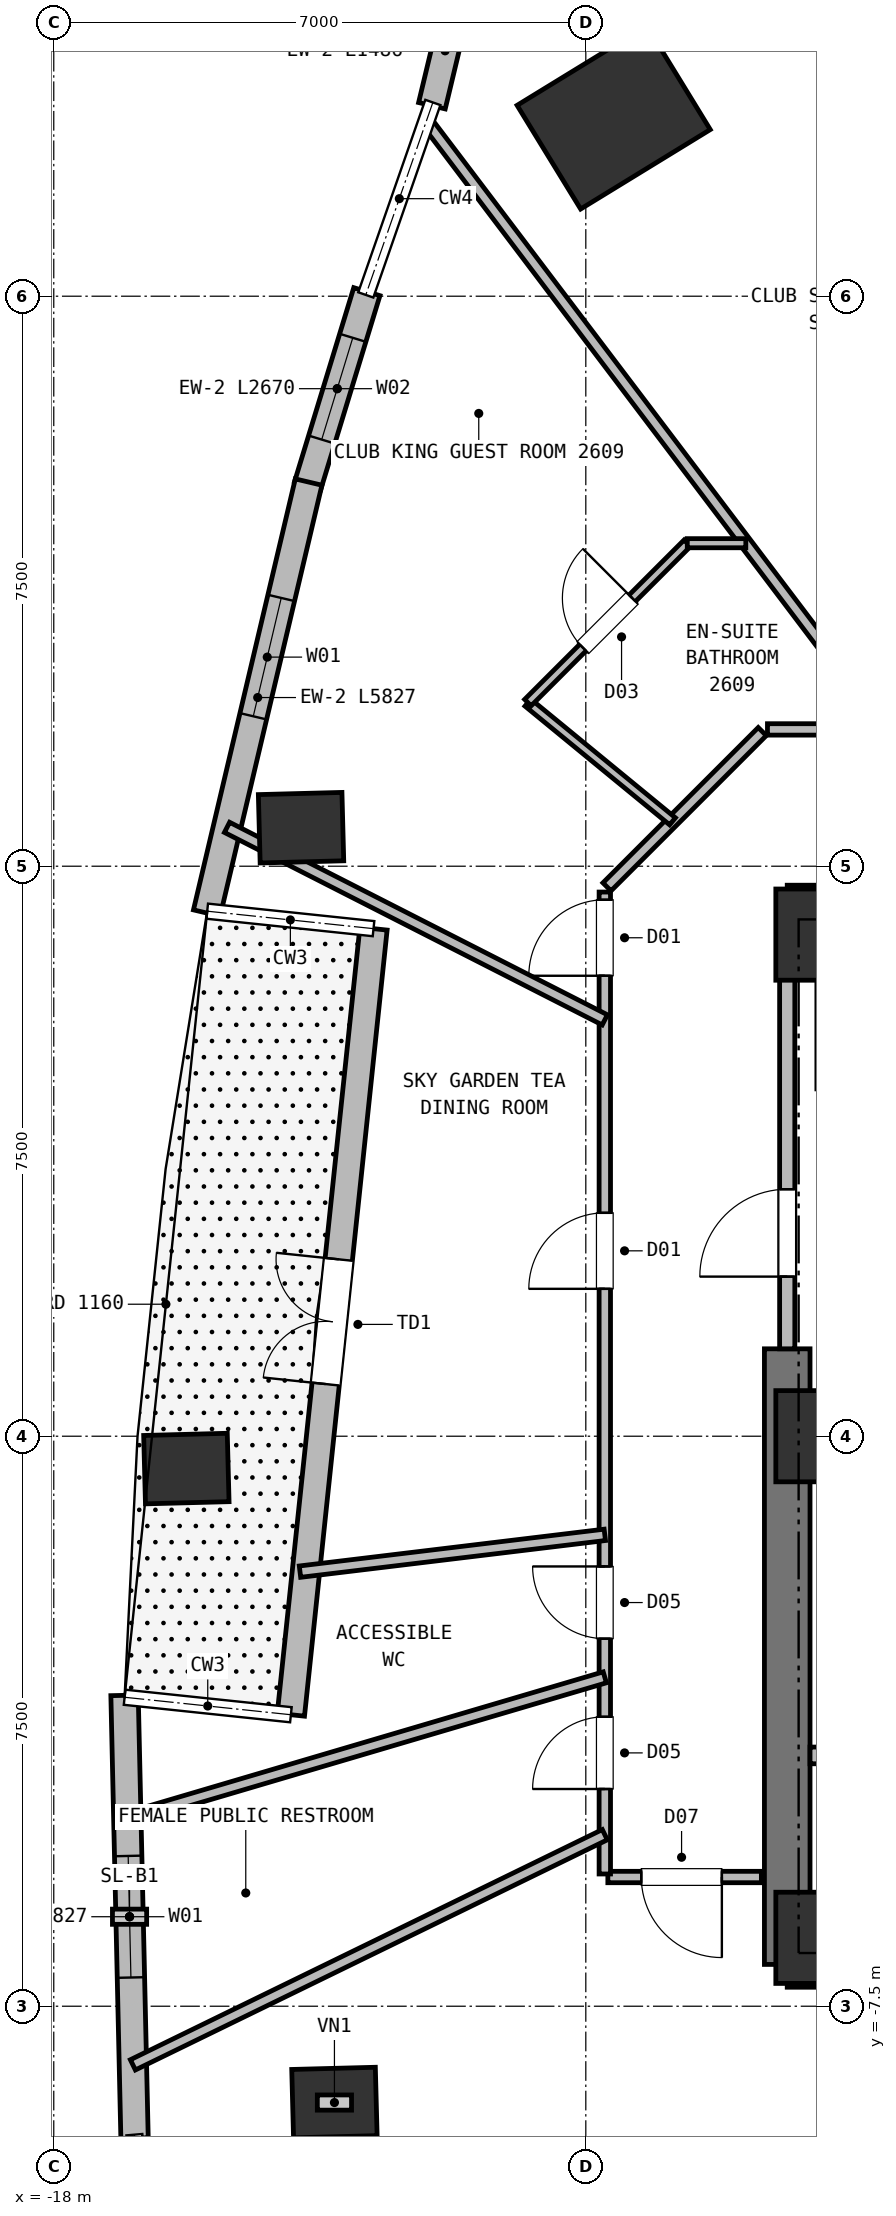
"""IFC4 building model, lengths in metres.
Left out: names, types, materials, properties, quantities, classifications, styles, units other than length and angle.
Written with IfcOpenShell. Run it as: python <this file> out.ifc"""

import sys

from ifc_helpers import new_model, si_unit, direction, frame, frame_2d, origin, origin_2d, place, context, subcontext, project, spatial, rectangle, extrude, element, fill, save


model = new_model("IFC4")
c1 = context("Model", 3, precision=1e-05, world=origin(), true_north=direction((0.0, 1.0)))
c2 = subcontext(c1, "Body", "Model", "MODEL_VIEW")
j1 = project(units=[si_unit("LENGTHUNIT", "METRE"), si_unit("PLANEANGLEUNIT", "RADIAN")], contexts=[c1])
p1 = place(None, origin())
s1 = spatial("IfcSite", under=j1, at=p1, CompositionType="ELEMENT")
p2 = place(p1, origin())
s2 = spatial("IfcBuilding", under=s1, at=p2, CompositionType="ELEMENT")
p3 = place(p2, frame((0.0, 0.0, 97.25)))
s3 = spatial("IfcBuildingStorey", under=s2, at=p3, CompositionType="ELEMENT", Elevation=97.25)
for number, where, z_axis, x_axis in (
    (1, (-8.0, -6.6, 0.0), (0.0, 0.0, 1.0), (1.0, 0.0, 0.0)),
    (2, (-8.0, 6.6, 0.0), (0.0, 0.0, 1.0), (1.0, 0.0, 0.0)),
    (3, (-8.0, 0.0, 0.0), (0.0, 0.0, 1.0), (1.0, 0.0, 0.0)),
):
    element("IfcColumn", number, at=place(p3, frame(where, z_axis=z_axis, x_axis=x_axis)), inside=s3, PredefinedType="COLUMN", context=c2, shape_type="SweptSolid", body=[
        extrude(rectangle(XDim=1.0, YDim=1.2, at=origin_2d()), origin(), (0.0, 0.0, 1.0), 3.75),
    ])
p4 = place(p3, frame((-8.35, 6.95, 0.0), z_axis=(0.0, 0.0, 1.0), x_axis=(1.0, 0.0, 0.0)))
e4 = element("IfcWall", 4, at=p4, inside=s3, PredefinedType="SHEAR", context=c2, shape_type="SweptSolid", body=[
    extrude(rectangle(XDim=16.7, YDim=0.6, at=frame_2d((8.35, 0.0))), origin(), (0.0, 0.0, 1.0), 3.5),
])
p5 = place(p3, frame((-8.35, -6.95, 0.0), z_axis=(0.0, 0.0, 1.0), x_axis=(1.0, 0.0, 0.0)))
e5 = element("IfcWall", 5, at=p5, inside=s3, PredefinedType="SHEAR", context=c2, shape_type="SweptSolid", body=[
    extrude(rectangle(XDim=3.95, YDim=0.6, at=frame_2d((1.975, 0.0))), origin(), (0.0, 0.0, 1.0), 3.5),
])
p6 = place(p3, frame((-8.35, -6.95, 0.0), z_axis=(0.0, 0.0, 1.0), x_axis=(0.0, 1.0, 0.0)))
e6 = element("IfcWall", 6, at=p6, inside=s3, PredefinedType="SHEAR", context=c2, shape_type="SweptSolid", body=[
    extrude(rectangle(XDim=8.1, YDim=0.6, at=frame_2d((4.05, 0.0))), origin(), (0.0, 0.0, 1.0), 3.5),
])
p7 = place(p3, frame((-10.633, 17.352, 0.0), z_axis=(0.0, 0.0, 1.0), x_axis=(-0.522498564716, 0.852640164354, 0.0)))
e7 = element("IfcColumn", 7, at=p7, inside=s3, PredefinedType="COLUMN", context=c2, shape_type="SweptSolid", body=[
    extrude(rectangle(XDim=1.6, YDim=2.0, at=origin_2d()), origin(), (0.0, 0.0, 1.0), 3.75),
])
for number, where, z_axis, x_axis in (
    (8, (-14.747, 8.007, 0.0), (0.0, 0.0, 1.0), (-0.026, 1.0, 0.0)),
    (9, (-16.255, -0.426, 0.0), (0.0, 0.0, 1.0), (-0.026, 1.0, 0.0)),
    (10, (-14.307, -8.768, 0.0), (0.0, 0.0, 1.0), (-0.026, 1.0, 0.0)),
):
    element("IfcColumn", number, at=place(p3, frame(where, z_axis=z_axis, x_axis=x_axis)), inside=s3, PredefinedType="COLUMN", context=c2, shape_type="SweptSolid", body=[
        extrude(rectangle(XDim=0.9, YDim=1.1, at=origin_2d()), origin(), (0.0, 0.0, 1.0), 3.75),
    ])
p8 = place(p3, frame((-14.88, -3.665, 0.0), z_axis=(0.0, 0.0, 1.0), x_axis=(0.104508820017, 0.994523959761, 0.0)))
e11 = element("IfcWall", 11, at=p8, inside=s3, PredefinedType="SOLIDWALL", context=c2, shape_type="SweptSolid", body=[
    extrude(rectangle(XDim=10.4, YDim=0.36, at=frame_2d((5.2, 0.0))), origin(), (0.0, 0.0, 1.0), 3.5),
])
p9 = place(p8, frame((4.375, 0.0, 0.0)))
e12 = element("IfcOpeningElement", 12, at=p9, cuts=e11, PredefinedType="OPENING", context=c2, shape_type="SweptSolid", body=[
    extrude(rectangle(XDim=1.65, YDim=2.25, at=frame_2d((0.825, 1.125))), frame((0.0, 0.19, 0.0), z_axis=(0.0, -1.0, 0.0), x_axis=(1.0, 0.0, 0.0)), (0.0, 0.0, 1.0), 0.38),
])
p10 = place(p3, frame((-13.025, 17.506, 0.0), z_axis=(0.0, 0.0, 1.0), x_axis=(0.23351590147, 0.972352983109, 0.0)))
e13 = element("IfcWall", 13, at=p10, inside=s3, PredefinedType="SOLIDWALL", context=c2, shape_type="SweptSolid", body=[
    extrude(rectangle(XDim=1.486, YDim=0.36, at=frame_2d((0.743, 0.0))), origin(), (0.0, 0.0, 1.0), 3.5),
])
p11 = place(p3, frame((-14.66, 12.507, 0.0), z_axis=(0.0, 0.0, 1.0), x_axis=(0.291842096338, 0.956466513164, 0.0)))
e14 = element("IfcWall", 14, at=p11, inside=s3, PredefinedType="SOLIDWALL", context=c2, shape_type="SweptSolid", body=[
    extrude(rectangle(XDim=2.669, YDim=0.36, at=frame_2d((1.335, 0.0))), origin(), (0.0, 0.0, 1.0), 3.5),
])
p12 = place(p11, frame((0.635, 0.0, 0.72)))
e15 = element("IfcOpeningElement", 15, at=p12, cuts=e14, PredefinedType="OPENING", context=c2, shape_type="SweptSolid", body=[
    extrude(rectangle(XDim=1.4, YDim=1.84, at=frame_2d((0.7, 0.92))), frame((0.0, 0.19, 0.0), z_axis=(0.0, -1.0, 0.0), x_axis=(1.0, 0.0, 0.0)), (0.0, 0.0, 1.0), 0.38),
])
p13 = place(p3, frame((-15.987, 6.884, 0.0), z_axis=(0.0, 0.0, 1.0), x_axis=(0.229945366281, 0.973203539105, 0.0)))
e16 = element("IfcWall", 16, at=p13, inside=s3, PredefinedType="SOLIDWALL", context=c2, shape_type="SweptSolid", body=[
    extrude(rectangle(XDim=5.827, YDim=0.36, at=frame_2d((2.914, 0.0))), origin(), (0.0, 0.0, 1.0), 3.5),
])
p14 = place(p13, frame((2.66, 0.0, 0.72)))
e17 = element("IfcOpeningElement", 17, at=p14, cuts=e16, PredefinedType="OPENING", context=c2, shape_type="SweptSolid", body=[
    extrude(rectangle(XDim=1.6, YDim=1.88, at=frame_2d((0.8, 0.94))), frame((0.0, 0.19, 0.0), z_axis=(0.0, -1.0, 0.0), x_axis=(1.0, 0.0, 0.0)), (0.0, 0.0, 1.0), 0.38),
])
p15 = place(p3, frame((-16.937, -9.235, 0.0), z_axis=(0.0, 0.0, 1.0), x_axis=(-0.022541523753, 0.999745907572, 0.0)))
e18 = element("IfcWall", 18, at=p15, inside=s3, PredefinedType="SOLIDWALL", context=c2, shape_type="SweptSolid", body=[
    extrude(rectangle(XDim=5.827, YDim=0.36, at=frame_2d((2.914, 0.0))), origin(), (0.0, 0.0, 1.0), 3.5),
])
p16 = place(p15, frame((2.113, 0.0, 0.72)))
e19 = element("IfcOpeningElement", 19, at=p16, cuts=e18, PredefinedType="OPENING", context=c2, shape_type="SweptSolid", body=[
    extrude(rectangle(XDim=1.6, YDim=1.88, at=frame_2d((0.8, 0.94))), frame((0.0, 0.19, 0.0), z_axis=(0.0, -1.0, 0.0), x_axis=(1.0, 0.0, 0.0)), (0.0, 0.0, 1.0), 0.38),
])
p17 = place(p3, frame((-8.05, -4.2, 0.0), z_axis=(0.0, 0.0, 1.0), x_axis=(1.0, 0.0, 0.0)))
e20 = element("IfcWall", 20, at=p17, inside=s3, PredefinedType="PARTITIONING", context=c2, shape_type="SweptSolid", body=[
    extrude(rectangle(XDim=0.96, YDim=0.22, at=frame_2d((0.48, 0.0))), origin(), (0.0, 0.0, 1.0), 3.5),
])
p18 = place(p3, frame((-8.35, 1.15, 0.0), z_axis=(0.0, 0.0, 1.0), x_axis=(0.0, 1.0, 0.0)))
e21 = element("IfcWall", 21, at=p18, inside=s3, PredefinedType="PARTITIONING", context=c2, shape_type="SweptSolid", body=[
    extrude(rectangle(XDim=5.4, YDim=0.2, at=frame_2d((2.7, 0.0))), origin(), (0.0, 0.0, 1.0), 3.5),
])
p19 = place(p18, frame((0.95, 0.0, 0.0)))
e22 = element("IfcOpeningElement", 22, at=p19, cuts=e21, PredefinedType="OPENING", context=c2, shape_type="SweptSolid", body=[
    extrude(rectangle(XDim=1.15, YDim=2.15, at=frame_2d((0.575, 1.075))), frame((0.0, 0.11, 0.0), z_axis=(0.0, -1.0, 0.0), x_axis=(1.0, 0.0, 0.0)), (0.0, 0.0, 1.0), 0.22),
])
p20 = place(p3, frame((-8.69, -5.8, 0.0), z_axis=(0.0, 0.0, 1.0), x_axis=(-1.0, 0.0, 0.0)))
e23 = element("IfcWall", 23, at=p20, inside=s3, PredefinedType="PARTITIONING", context=c2, shape_type="SweptSolid", body=[
    extrude(rectangle(XDim=2.02, YDim=0.15, at=frame_2d((1.01, 0.0))), origin(), (0.0, 0.0, 1.0), 3.5),
])
p21 = place(p20, frame((0.52, 0.0, 0.0)))
e24 = element("IfcOpeningElement", 24, at=p21, cuts=e23, PredefinedType="OPENING", context=c2, shape_type="SweptSolid", body=[
    extrude(rectangle(XDim=1.06, YDim=2.15, at=frame_2d((0.53, 1.075))), frame((0.0, 0.085, 0.0), z_axis=(0.0, -1.0, 0.0), x_axis=(1.0, 0.0, 0.0)), (0.0, 0.0, 1.0), 0.17),
])
p22 = place(p3, frame((-8.61, 9.3, 0.0), z_axis=(0.0, 0.0, 1.0), x_axis=(1.0, 0.0, 0.0)))
e25 = element("IfcWall", 25, at=p22, inside=s3, PredefinedType="PARTITIONING", context=c2, shape_type="SweptSolid", body=[
    extrude(rectangle(XDim=17.22, YDim=0.15, at=frame_2d((8.61, 0.0))), origin(), (0.0, 0.0, 1.0), 3.5),
])
p23 = place(p22, frame((11.167, 0.0, 0.0)))
e26 = element("IfcOpeningElement", 26, at=p23, cuts=e25, PredefinedType="OPENING", context=c2, shape_type="SweptSolid", body=[
    extrude(rectangle(XDim=1.0, YDim=2.15, at=frame_2d((0.5, 1.075))), frame((0.0, 0.085, 0.0), z_axis=(0.0, -1.0, 0.0), x_axis=(1.0, 0.0, 0.0)), (0.0, 0.0, 1.0), 0.17),
])
p24 = place(p22, frame((6.944, 0.0, 0.0)))
e27 = element("IfcOpeningElement", 27, at=p24, cuts=e25, PredefinedType="OPENING", context=c2, shape_type="SweptSolid", body=[
    extrude(rectangle(XDim=1.06, YDim=2.15, at=frame_2d((0.53, 1.075))), frame((0.0, 0.085, 0.0), z_axis=(0.0, -1.0, 0.0), x_axis=(1.0, 0.0, 0.0)), (0.0, 0.0, 1.0), 0.17),
])
p25 = place(p22, frame((2.311, 0.0, 0.0)))
e28 = element("IfcOpeningElement", 28, at=p25, cuts=e25, PredefinedType="OPENING", context=c2, shape_type="SweptSolid", body=[
    extrude(rectangle(XDim=1.06, YDim=2.15, at=frame_2d((0.53, 1.075))), frame((0.0, 0.085, 0.0), z_axis=(0.0, -1.0, 0.0), x_axis=(1.0, 0.0, 0.0)), (0.0, 0.0, 1.0), 0.17),
])
p26 = place(p3, frame((-10.722, 7.228, 0.0), z_axis=(0.0, 0.0, 1.0), x_axis=(0.707106781187, 0.707106781187, 0.0)))
e29 = element("IfcWall", 29, at=p26, inside=s3, PredefinedType="PARTITIONING", context=c2, shape_type="SweptSolid", body=[
    extrude(rectangle(XDim=2.89, YDim=0.15, at=frame_2d((1.445, 0.0))), origin(), (0.0, 0.0, 1.0), 3.5),
])
p27 = place(p3, frame((-10.75, -5.76, 0.0), z_axis=(0.0, 0.0, 1.0), x_axis=(0.0, 1.0, 0.0)))
e30 = element("IfcWall", 30, at=p27, inside=s3, PredefinedType="PARTITIONING", context=c2, shape_type="SweptSolid", body=[
    extrude(rectangle(XDim=12.92, YDim=0.15, at=frame_2d((6.46, 0.0))), origin(), (0.0, 0.0, 1.0), 3.5),
])
p28 = place(p27, frame((3.096, 0.0, 0.0)))
e31 = element("IfcOpeningElement", 31, at=p28, cuts=e30, PredefinedType="OPENING", context=c2, shape_type="SweptSolid", body=[
    extrude(rectangle(XDim=0.95, YDim=2.1, at=frame_2d((0.475, 1.05))), frame((0.0, 0.085, 0.0), z_axis=(0.0, -1.0, 0.0), x_axis=(1.0, 0.0, 0.0)), (0.0, 0.0, 1.0), 0.17),
])
p29 = place(p27, frame((1.118, 0.0, 0.0)))
e32 = element("IfcOpeningElement", 32, at=p29, cuts=e30, PredefinedType="OPENING", context=c2, shape_type="SweptSolid", body=[
    extrude(rectangle(XDim=0.95, YDim=2.1, at=frame_2d((0.475, 1.05))), frame((0.0, 0.085, 0.0), z_axis=(0.0, -1.0, 0.0), x_axis=(1.0, 0.0, 0.0)), (0.0, 0.0, 1.0), 0.17),
])
p30 = place(p27, frame((7.699, 0.0, 0.0)))
e33 = element("IfcOpeningElement", 33, at=p30, cuts=e30, PredefinedType="OPENING", context=c2, shape_type="SweptSolid", body=[
    extrude(rectangle(XDim=1.0, YDim=2.15, at=frame_2d((0.5, 1.075))), frame((0.0, 0.085, 0.0), z_axis=(0.0, -1.0, 0.0), x_axis=(1.0, 0.0, 0.0)), (0.0, 0.0, 1.0), 0.17),
])
p31 = place(p27, frame((11.819, 0.0, 0.0)))
e34 = element("IfcOpeningElement", 34, at=p31, cuts=e30, PredefinedType="OPENING", context=c2, shape_type="SweptSolid", body=[
    extrude(rectangle(XDim=1.0, YDim=2.15, at=frame_2d((0.5, 1.075))), frame((0.0, 0.085, 0.0), z_axis=(0.0, -1.0, 0.0), x_axis=(1.0, 0.0, 0.0)), (0.0, 0.0, 1.0), 0.17),
])
p32 = place(p3, frame((-10.75, -5.243, 0.0), z_axis=(0.0, 0.0, 1.0), x_axis=(-0.898794257847, -0.438370713052, 0.0)))
e35 = element("IfcWall", 35, at=p32, inside=s3, PredefinedType="PARTITIONING", context=c2, shape_type="SweptSolid", body=[
    extrude(rectangle(XDim=6.908, YDim=0.15, at=frame_2d((3.454, 0.0))), origin(), (0.0, 0.0, 1.0), 3.5),
])
p33 = place(p3, frame((-7.04, 9.3, 0.0), z_axis=(0.0, 0.0, 1.0), x_axis=(-0.60357057416, 0.797309577271, 0.0)))
e36 = element("IfcWall", 36, at=p33, inside=s3, PredefinedType="PARTITIONING", context=c2, shape_type="SweptSolid", body=[
    extrude(rectangle(XDim=10.037, YDim=0.15, at=frame_2d((5.019, 0.0))), origin(), (0.0, 0.0, 1.0), 3.5),
])
p34 = place(p3, frame((-11.762, 9.653, 0.0), z_axis=(0.0, 0.0, 1.0), x_axis=(0.773019750399, -0.634381955523, 0.0)))
e37 = element("IfcWall", 37, at=p34, inside=s3, PredefinedType="PARTITIONING", context=c2, shape_type="SweptSolid", body=[
    extrude(rectangle(XDim=2.462, YDim=0.12, at=frame_2d((1.231, 0.0))), origin(), (0.0, 0.0, 1.0), 3.5),
])
p35 = place(p3, frame((-11.762, 9.653, 0.0), z_axis=(0.0, 0.0, 1.0), x_axis=(0.707106781187, 0.707106781187, 0.0)))
e38 = element("IfcWall", 38, at=p35, inside=s3, PredefinedType="PARTITIONING", context=c2, shape_type="SweptSolid", body=[
    extrude(rectangle(XDim=2.966, YDim=0.12, at=frame_2d((1.483, 0.0))), origin(), (0.0, 0.0, 1.0), 3.5),
])
p36 = place(p35, frame((1.023, 0.0, 0.0)))
e39 = element("IfcOpeningElement", 39, at=p36, cuts=e38, PredefinedType="OPENING", context=c2, shape_type="SweptSolid", body=[
    extrude(rectangle(XDim=0.92, YDim=2.1, at=frame_2d((0.46, 1.05))), frame((0.0, 0.07, 0.0), z_axis=(0.0, -1.0, 0.0), x_axis=(1.0, 0.0, 0.0)), (0.0, 0.0, 1.0), 0.14),
])
p37 = place(p3, frame((-8.895, 11.75, 0.0), z_axis=(0.0, 0.0, 1.0), x_axis=(-1.0, 0.0, 0.0)))
e40 = element("IfcWall", 40, at=p37, inside=s3, PredefinedType="PARTITIONING", context=c2, shape_type="SweptSolid", body=[
    extrude(rectangle(XDim=0.77, YDim=0.12, at=frame_2d((0.385, 0.0))), origin(), (0.0, 0.0, 1.0), 3.5),
])
p38 = place(p3, frame((-10.75, 5.478, 0.0), z_axis=(0.0, 0.0, 1.0), x_axis=(-0.890978705021, 0.454045093796, 0.0)))
e41 = element("IfcWall", 41, at=p38, inside=s3, PredefinedType="PARTITIONING", context=c2, shape_type="SweptSolid", body=[
    extrude(rectangle(XDim=5.579, YDim=0.15, at=frame_2d((2.789, 0.0))), origin(), (0.0, 0.0, 1.0), 3.5),
])
p39 = place(p3, frame((-10.75, -1.298, 0.0), z_axis=(0.0, 0.0, 1.0), x_axis=(-0.992792513818, -0.119845836422, 0.0)))
e42 = element("IfcWall", 42, at=p39, inside=s3, PredefinedType="PARTITIONING", context=c2, shape_type="SweptSolid", body=[
    extrude(rectangle(XDim=4.04, YDim=0.15, at=frame_2d((2.02, 0.0))), origin(), (0.0, 0.0, 1.0), 3.5),
])
p40 = place(p3, frame((-10.75, -3.173, 0.0), z_axis=(0.0, 0.0, 1.0), x_axis=(-0.959115252186, -0.283015782288, 0.0)))
e43 = element("IfcWall", 43, at=p40, inside=s3, PredefinedType="PARTITIONING", context=c2, shape_type="SweptSolid", body=[
    extrude(rectangle(XDim=6.55, YDim=0.15, at=frame_2d((3.275, 0.0))), origin(), (0.0, 0.0, 1.0), 3.5),
])
p41 = place(p9, origin())
e44 = element("IfcDoor", 44, at=p41, inside=s3, OperationType="DOUBLE_DOOR_SINGLE_SWING", PredefinedType="DOOR", context=c2, shape_type="SweptSolid", body=[
    extrude(rectangle(XDim=1.65, YDim=2.25, at=frame_2d((0.825, 1.125))), frame((0.0, 0.025, 0.0), z_axis=(0.0, -1.0, 0.0), x_axis=(1.0, 0.0, 0.0)), (0.0, 0.0, 1.0), 0.05),
])
fill(e12, e44)
p42 = place(p12, origin())
e45 = element("IfcWindow", 45, at=p42, inside=s3, PartitioningType="SINGLE_PANEL", PredefinedType="WINDOW", context=c2, shape_type="SweptSolid", body=[
    extrude(rectangle(XDim=1.4, YDim=1.84, at=frame_2d((0.7, 0.92))), frame((0.0, 0.03, 0.0), z_axis=(0.0, -1.0, 0.0), x_axis=(1.0, 0.0, 0.0)), (0.0, 0.0, 1.0), 0.06),
])
fill(e15, e45)
p43 = place(p14, origin())
e46 = element("IfcWindow", 46, at=p43, inside=s3, PartitioningType="SINGLE_PANEL", PredefinedType="WINDOW", context=c2, shape_type="SweptSolid", body=[
    extrude(rectangle(XDim=1.6, YDim=1.88, at=frame_2d((0.8, 0.94))), frame((0.0, 0.03, 0.0), z_axis=(0.0, -1.0, 0.0), x_axis=(1.0, 0.0, 0.0)), (0.0, 0.0, 1.0), 0.06),
])
fill(e17, e46)
p44 = place(p16, origin())
e47 = element("IfcWindow", 47, at=p44, inside=s3, PartitioningType="SINGLE_PANEL", PredefinedType="WINDOW", context=c2, shape_type="SweptSolid", body=[
    extrude(rectangle(XDim=1.6, YDim=1.88, at=frame_2d((0.8, 0.94))), frame((0.0, 0.03, 0.0), z_axis=(0.0, -1.0, 0.0), x_axis=(1.0, 0.0, 0.0)), (0.0, 0.0, 1.0), 0.06),
])
fill(e19, e47)
p45 = place(p19, origin())
e48 = element("IfcDoor", 48, at=p45, inside=s3, OperationType="SINGLE_SWING_LEFT", PredefinedType="DOOR", context=c2, shape_type="SweptSolid", body=[
    extrude(rectangle(XDim=1.15, YDim=2.15, at=frame_2d((0.575, 1.075))), frame((0.0, 0.025, 0.0), z_axis=(0.0, -1.0, 0.0), x_axis=(1.0, 0.0, 0.0)), (0.0, 0.0, 1.0), 0.05),
])
fill(e22, e48)
p46 = place(p36, origin())
e49 = element("IfcDoor", 49, at=p46, inside=s3, OperationType="SINGLE_SWING_RIGHT", PredefinedType="DOOR", context=c2, shape_type="SweptSolid", body=[
    extrude(rectangle(XDim=0.92, YDim=2.1, at=frame_2d((0.46, 1.05))), frame((0.0, 0.025, 0.0), z_axis=(0.0, -1.0, 0.0), x_axis=(1.0, 0.0, 0.0)), (0.0, 0.0, 1.0), 0.05),
])
fill(e39, e49)
p47 = place(p28, origin())
e50 = element("IfcDoor", 50, at=p47, inside=s3, OperationType="SINGLE_SWING_RIGHT", PredefinedType="DOOR", context=c2, shape_type="SweptSolid", body=[
    extrude(rectangle(XDim=0.95, YDim=2.1, at=frame_2d((0.475, 1.05))), frame((0.0, 0.025, 0.0), z_axis=(0.0, -1.0, 0.0), x_axis=(1.0, 0.0, 0.0)), (0.0, 0.0, 1.0), 0.05),
])
fill(e31, e50)
p48 = place(p29, origin())
e51 = element("IfcDoor", 51, at=p48, inside=s3, OperationType="SINGLE_SWING_LEFT", PredefinedType="DOOR", context=c2, shape_type="SweptSolid", body=[
    extrude(rectangle(XDim=0.95, YDim=2.1, at=frame_2d((0.475, 1.05))), frame((0.0, 0.025, 0.0), z_axis=(0.0, -1.0, 0.0), x_axis=(1.0, 0.0, 0.0)), (0.0, 0.0, 1.0), 0.05),
])
fill(e32, e51)
p49 = place(p30, origin())
e52 = element("IfcDoor", 52, at=p49, inside=s3, OperationType="SINGLE_SWING_LEFT", PredefinedType="DOOR", context=c2, shape_type="SweptSolid", body=[
    extrude(rectangle(XDim=1.0, YDim=2.15, at=frame_2d((0.5, 1.075))), frame((0.0, 0.025, 0.0), z_axis=(0.0, -1.0, 0.0), x_axis=(1.0, 0.0, 0.0)), (0.0, 0.0, 1.0), 0.05),
])
fill(e33, e52)
p50 = place(p31, origin())
e53 = element("IfcDoor", 53, at=p50, inside=s3, OperationType="SINGLE_SWING_LEFT", PredefinedType="DOOR", context=c2, shape_type="SweptSolid", body=[
    extrude(rectangle(XDim=1.0, YDim=2.15, at=frame_2d((0.5, 1.075))), frame((0.0, 0.025, 0.0), z_axis=(0.0, -1.0, 0.0), x_axis=(1.0, 0.0, 0.0)), (0.0, 0.0, 1.0), 0.05),
])
fill(e34, e53)
p51 = place(p21, origin())
e54 = element("IfcDoor", 54, at=p51, inside=s3, OperationType="SINGLE_SWING_LEFT", PredefinedType="DOOR", context=c2, shape_type="SweptSolid", body=[
    extrude(rectangle(XDim=1.06, YDim=2.15, at=frame_2d((0.53, 1.075))), frame((0.0, 0.025, 0.0), z_axis=(0.0, -1.0, 0.0), x_axis=(1.0, 0.0, 0.0)), (0.0, 0.0, 1.0), 0.05),
])
fill(e24, e54)
save(model, sys.argv[1])
